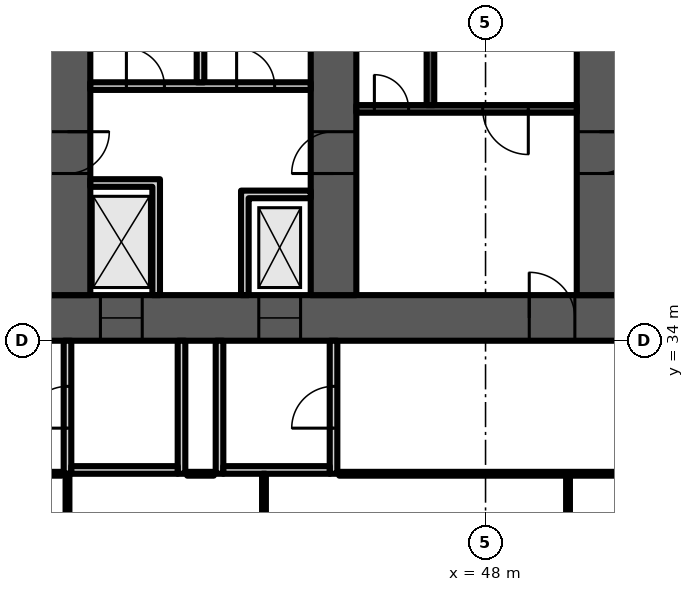
"""IFC4 building model, lengths in metres.
Left out: names, types, materials, properties, quantities, classifications, styles, units other than length and angle.
Written with IfcOpenShell. Run it as: python <this file> out.ifc"""

import sys

from ifc_helpers import new_model, si_unit, direction, frame, frame_2d, origin, place, context, subcontext, project, spatial, polyline, rectangle, outline, extrude, element, fill, save


model = new_model("IFC4")
c1 = context("Model", 3, precision=1e-05, world=origin(), true_north=direction((0.0, 1.0)))
c2 = subcontext(c1, "Body", "Model", "MODEL_VIEW")
j1 = project(units=[si_unit("LENGTHUNIT", "METRE"), si_unit("PLANEANGLEUNIT", "RADIAN")], contexts=[c1])
p1 = place(None, origin())
s1 = spatial("IfcSite", under=j1, at=p1, CompositionType="ELEMENT")
p2 = place(p1, origin())
s2 = spatial("IfcBuilding", under=s1, at=p2, CompositionType="ELEMENT")
p3 = place(p2, frame((0.0, 0.0, 48.7)))
s3 = spatial("IfcBuildingStorey", under=s2, at=p3, CompositionType="ELEMENT", Elevation=48.7)
p4 = place(p3, frame((9.0, 34.6, 0.0), z_axis=(0.0, 0.0, 1.0), x_axis=(1.0, 0.0, 0.0)))
e1 = element("IfcWall", 1, at=p4, inside=s3, PredefinedType="SHEAR", context=c2, shape_type="SweptSolid", body=[
    extrude(rectangle(XDim=56.0, YDim=1.2, at=frame_2d((28.0, 0.0))), origin(), (0.0, 0.0, 1.0), 3.6),
])
p5 = place(p4, frame((3.3, 0.0, 0.0)))
e2 = element("IfcOpeningElement", 2, at=p5, cuts=e1, PredefinedType="OPENING", context=c2, shape_type="SweptSolid", body=[
    extrude(rectangle(XDim=1.0, YDim=2.1, at=frame_2d((0.5, 1.05))), frame((0.0, 0.61, 0.0), z_axis=(0.0, -1.0, 0.0), x_axis=(1.0, 0.0, 0.0)), (0.0, 0.0, 1.0), 1.22),
])
p6 = place(p4, frame((7.867, 0.0, 0.0)))
e3 = element("IfcOpeningElement", 3, at=p6, cuts=e1, PredefinedType="OPENING", context=c2, shape_type="SweptSolid", body=[
    extrude(rectangle(XDim=1.1, YDim=2.1, at=frame_2d((0.55, 1.05))), frame((0.0, 0.61, 0.0), z_axis=(0.0, -1.0, 0.0), x_axis=(1.0, 0.0, 0.0)), (0.0, 0.0, 1.0), 1.22),
])
p7 = place(p4, frame((12.033, 0.0, 0.0)))
e4 = element("IfcOpeningElement", 4, at=p7, cuts=e1, PredefinedType="OPENING", context=c2, shape_type="SweptSolid", body=[
    extrude(rectangle(XDim=1.1, YDim=2.1, at=frame_2d((0.55, 1.05))), frame((0.0, 0.61, 0.0), z_axis=(0.0, -1.0, 0.0), x_axis=(1.0, 0.0, 0.0)), (0.0, 0.0, 1.0), 1.22),
])
p8 = place(p4, frame((9.8, 0.0, 0.0)))
e5 = element("IfcOpeningElement", 5, at=p8, cuts=e1, PredefinedType="OPENING", context=c2, shape_type="SweptSolid", body=[
    extrude(rectangle(XDim=1.4, YDim=2.1, at=frame_2d((0.7, 1.05))), frame((0.0, 0.61, 0.0), z_axis=(0.0, -1.0, 0.0), x_axis=(1.0, 0.0, 0.0)), (0.0, 0.0, 1.0), 1.22),
])
p9 = place(p4, frame((14.65, 0.0, 0.0)))
e6 = element("IfcOpeningElement", 6, at=p9, cuts=e1, PredefinedType="OPENING", context=c2, shape_type="SweptSolid", body=[
    extrude(rectangle(XDim=1.2, YDim=2.1, at=frame_2d((0.6, 1.05))), frame((0.0, 0.61, 0.0), z_axis=(0.0, -1.0, 0.0), x_axis=(1.0, 0.0, 0.0)), (0.0, 0.0, 1.0), 1.22),
])
p10 = place(p4, frame((21.867, 0.0, 0.0)))
e7 = element("IfcOpeningElement", 7, at=p10, cuts=e1, PredefinedType="OPENING", context=c2, shape_type="SweptSolid", body=[
    extrude(rectangle(XDim=1.1, YDim=2.1, at=frame_2d((0.55, 1.05))), frame((0.0, 0.61, 0.0), z_axis=(0.0, -1.0, 0.0), x_axis=(1.0, 0.0, 0.0)), (0.0, 0.0, 1.0), 1.22),
])
p11 = place(p4, frame((26.033, 0.0, 0.0)))
e8 = element("IfcOpeningElement", 8, at=p11, cuts=e1, PredefinedType="OPENING", context=c2, shape_type="SweptSolid", body=[
    extrude(rectangle(XDim=1.1, YDim=2.1, at=frame_2d((0.55, 1.05))), frame((0.0, 0.61, 0.0), z_axis=(0.0, -1.0, 0.0), x_axis=(1.0, 0.0, 0.0)), (0.0, 0.0, 1.0), 1.22),
])
p12 = place(p4, frame((23.8, 0.0, 0.0)))
e9 = element("IfcOpeningElement", 9, at=p12, cuts=e1, PredefinedType="OPENING", context=c2, shape_type="SweptSolid", body=[
    extrude(rectangle(XDim=1.4, YDim=2.1, at=frame_2d((0.7, 1.05))), frame((0.0, 0.61, 0.0), z_axis=(0.0, -1.0, 0.0), x_axis=(1.0, 0.0, 0.0)), (0.0, 0.0, 1.0), 1.22),
])
p13 = place(p4, frame((28.867, 0.0, 0.0)))
e10 = element("IfcOpeningElement", 10, at=p13, cuts=e1, PredefinedType="OPENING", context=c2, shape_type="SweptSolid", body=[
    extrude(rectangle(XDim=1.1, YDim=2.1, at=frame_2d((0.55, 1.05))), frame((0.0, 0.61, 0.0), z_axis=(0.0, -1.0, 0.0), x_axis=(1.0, 0.0, 0.0)), (0.0, 0.0, 1.0), 1.22),
])
p14 = place(p4, frame((33.033, 0.0, 0.0)))
e11 = element("IfcOpeningElement", 11, at=p14, cuts=e1, PredefinedType="OPENING", context=c2, shape_type="SweptSolid", body=[
    extrude(rectangle(XDim=1.1, YDim=2.1, at=frame_2d((0.55, 1.05))), frame((0.0, 0.61, 0.0), z_axis=(0.0, -1.0, 0.0), x_axis=(1.0, 0.0, 0.0)), (0.0, 0.0, 1.0), 1.22),
])
p15 = place(p4, frame((40.15, 0.0, 0.0)))
e12 = element("IfcOpeningElement", 12, at=p15, cuts=e1, PredefinedType="OPENING", context=c2, shape_type="SweptSolid", body=[
    extrude(rectangle(XDim=1.2, YDim=2.1, at=frame_2d((0.6, 1.05))), frame((0.0, 0.61, 0.0), z_axis=(0.0, -1.0, 0.0), x_axis=(1.0, 0.0, 0.0)), (0.0, 0.0, 1.0), 1.22),
])
p16 = place(p4, frame((44.8, 0.0, 0.0)))
e13 = element("IfcOpeningElement", 13, at=p16, cuts=e1, PredefinedType="OPENING", context=c2, shape_type="SweptSolid", body=[
    extrude(rectangle(XDim=1.4, YDim=2.1, at=frame_2d((0.7, 1.05))), frame((0.0, 0.61, 0.0), z_axis=(0.0, -1.0, 0.0), x_axis=(1.0, 0.0, 0.0)), (0.0, 0.0, 1.0), 1.22),
])
p17 = place(p4, frame((49.867, 0.0, 0.0)))
e14 = element("IfcOpeningElement", 14, at=p17, cuts=e1, PredefinedType="OPENING", context=c2, shape_type="SweptSolid", body=[
    extrude(rectangle(XDim=1.1, YDim=2.1, at=frame_2d((0.55, 1.05))), frame((0.0, 0.61, 0.0), z_axis=(0.0, -1.0, 0.0), x_axis=(1.0, 0.0, 0.0)), (0.0, 0.0, 1.0), 1.22),
])
p18 = place(p4, frame((53.5, 0.0, 0.0)))
e15 = element("IfcOpeningElement", 15, at=p18, cuts=e1, PredefinedType="OPENING", context=c2, shape_type="SweptSolid", body=[
    extrude(rectangle(XDim=1.1, YDim=2.1, at=frame_2d((0.55, 1.05))), frame((0.0, 0.61, 0.0), z_axis=(0.0, -1.0, 0.0), x_axis=(1.0, 0.0, 0.0)), (0.0, 0.0, 1.0), 1.22),
])
p19 = place(p4, frame((51.567, 0.0, 0.0)))
e16 = element("IfcOpeningElement", 16, at=p19, cuts=e1, PredefinedType="OPENING", context=c2, shape_type="SweptSolid", body=[
    extrude(rectangle(XDim=1.4, YDim=2.1, at=frame_2d((0.7, 1.05))), frame((0.0, 0.61, 0.0), z_axis=(0.0, -1.0, 0.0), x_axis=(1.0, 0.0, 0.0)), (0.0, 0.0, 1.0), 1.22),
])
p20 = place(p3, frame((37.0, 35.2, 0.0), z_axis=(0.0, 0.0, 1.0), x_axis=(0.0, 1.0, 0.0)))
e17 = element("IfcWall", 17, at=p20, inside=s3, PredefinedType="SHEAR", context=c2, shape_type="SweptSolid", body=[
    extrude(rectangle(XDim=14.78, YDim=1.2, at=frame_2d((7.39, 0.0))), origin(), (0.0, 0.0, 1.0), 3.6),
])
p21 = place(p20, frame((3.2, 0.0, 0.0)))
e18 = element("IfcOpeningElement", 18, at=p21, cuts=e17, PredefinedType="OPENING", context=c2, shape_type="SweptSolid", body=[
    extrude(rectangle(XDim=1.1, YDim=2.1, at=frame_2d((0.55, 1.05))), frame((0.0, 0.61, 0.0), z_axis=(0.0, -1.0, 0.0), x_axis=(1.0, 0.0, 0.0)), (0.0, 0.0, 1.0), 1.22),
])
p22 = place(p20, frame((9.6, 0.0, 0.0)))
e19 = element("IfcOpeningElement", 19, at=p22, cuts=e17, PredefinedType="OPENING", context=c2, shape_type="SweptSolid", body=[
    extrude(rectangle(XDim=1.0, YDim=2.1, at=frame_2d((0.5, 1.05))), frame((0.0, 0.61, 0.0), z_axis=(0.0, -1.0, 0.0), x_axis=(1.0, 0.0, 0.0)), (0.0, 0.0, 1.0), 1.22),
])
p23 = place(p3, frame((44.0, 35.2, 0.0), z_axis=(0.0, 0.0, 1.0), x_axis=(0.0, 1.0, 0.0)))
e20 = element("IfcWall", 20, at=p23, inside=s3, PredefinedType="SHEAR", context=c2, shape_type="SweptSolid", body=[
    extrude(rectangle(XDim=14.168, YDim=1.2, at=frame_2d((7.084, 0.0))), origin(), (0.0, 0.0, 1.0), 3.6),
])
p24 = place(p23, frame((3.2, 0.0, 0.0)))
e21 = element("IfcOpeningElement", 21, at=p24, cuts=e20, PredefinedType="OPENING", context=c2, shape_type="SweptSolid", body=[
    extrude(rectangle(XDim=1.1, YDim=2.1, at=frame_2d((0.55, 1.05))), frame((0.0, 0.61, 0.0), z_axis=(0.0, -1.0, 0.0), x_axis=(1.0, 0.0, 0.0)), (0.0, 0.0, 1.0), 1.22),
])
p25 = place(p23, frame((9.6, 0.0, 0.0)))
e22 = element("IfcOpeningElement", 22, at=p25, cuts=e20, PredefinedType="OPENING", context=c2, shape_type="SweptSolid", body=[
    extrude(rectangle(XDim=1.0, YDim=2.1, at=frame_2d((0.5, 1.05))), frame((0.0, 0.61, 0.0), z_axis=(0.0, -1.0, 0.0), x_axis=(1.0, 0.0, 0.0)), (0.0, 0.0, 1.0), 1.22),
])
p26 = place(p3, frame((51.0, 35.2, 0.0), z_axis=(0.0, 0.0, 1.0), x_axis=(0.0, 1.0, 0.0)))
e23 = element("IfcWall", 23, at=p26, inside=s3, PredefinedType="SHEAR", context=c2, shape_type="SweptSolid", body=[
    extrude(rectangle(XDim=13.555, YDim=1.2, at=frame_2d((6.778, 0.0))), origin(), (0.0, 0.0, 1.0), 3.6),
])
p27 = place(p26, frame((3.2, 0.0, 0.0)))
e24 = element("IfcOpeningElement", 24, at=p27, cuts=e23, PredefinedType="OPENING", context=c2, shape_type="SweptSolid", body=[
    extrude(rectangle(XDim=1.1, YDim=2.1, at=frame_2d((0.55, 1.05))), frame((0.0, 0.61, 0.0), z_axis=(0.0, -1.0, 0.0), x_axis=(1.0, 0.0, 0.0)), (0.0, 0.0, 1.0), 1.22),
])
p28 = place(p3, frame((37.6, 40.7, 0.0), z_axis=(0.0, 0.0, 1.0), x_axis=(1.0, 0.0, 0.0)))
e25 = element("IfcWall", 25, at=p28, inside=s3, PredefinedType="PARTITIONING", context=c2, shape_type="SweptSolid", body=[
    extrude(rectangle(XDim=5.8, YDim=0.2, at=frame_2d((2.9, 0.0))), origin(), (0.0, 0.0, 1.0), 3.2),
])
p29 = place(p28, frame((0.95, 0.0, 0.0)))
e26 = element("IfcOpeningElement", 26, at=p29, cuts=e25, PredefinedType="OPENING", context=c2, shape_type="SweptSolid", body=[
    extrude(rectangle(XDim=1.0, YDim=2.1, at=frame_2d((0.5, 1.05))), frame((0.0, 0.11, 0.0), z_axis=(0.0, -1.0, 0.0), x_axis=(1.0, 0.0, 0.0)), (0.0, 0.0, 1.0), 0.22),
])
p30 = place(p28, frame((3.85, 0.0, 0.0)))
e27 = element("IfcOpeningElement", 27, at=p30, cuts=e25, PredefinedType="OPENING", context=c2, shape_type="SweptSolid", body=[
    extrude(rectangle(XDim=1.0, YDim=2.1, at=frame_2d((0.5, 1.05))), frame((0.0, 0.11, 0.0), z_axis=(0.0, -1.0, 0.0), x_axis=(1.0, 0.0, 0.0)), (0.0, 0.0, 1.0), 0.22),
])
p31 = place(p3, frame((0.0, 0.0, -0.0)))
e28 = element("IfcWall", 28, at=p31, inside=s3, PredefinedType="PARTITIONING", context=c2, shape_type="SweptSolid", body=[
    extrude(outline(polyline([(41.567, 37.95), (41.767, 37.95), (43.4, 37.95), (43.4, 37.75), (41.767, 37.75), (41.767, 35.2), (41.567, 35.2), (41.567, 37.95)])), origin(), (0.0, 0.0, 1.0), 3.2),
])
p32 = place(p3, frame((0.0, 0.0, -0.0)))
e29 = element("IfcWall", 29, at=p32, inside=s3, PredefinedType="PARTITIONING", context=c2, shape_type="SweptSolid", body=[
    extrude(outline(polyline([(39.233, 38.05), (37.6, 38.05), (37.6, 38.25), (39.233, 38.25), (39.433, 38.25), (39.433, 35.2), (39.233, 35.2), (39.233, 38.05)])), origin(), (0.0, 0.0, 1.0), 3.2),
])
p33 = place(p3, frame((40.5, 40.8, 0.0), z_axis=(0.0, 0.0, 1.0), x_axis=(0.0, 1.0, 0.0)))
e30 = element("IfcWall", 30, at=p33, inside=s3, PredefinedType="PARTITIONING", context=c2, shape_type="SweptSolid", body=[
    extrude(rectangle(XDim=8.653, YDim=0.2, at=frame_2d((4.326, 0.0))), origin(), (0.0, 0.0, 1.0), 3.2),
])
p34 = place(p3, frame((44.6, 40.1, 0.0), z_axis=(0.0, 0.0, 1.0), x_axis=(1.0, 0.0, 0.0)))
e31 = element("IfcWall", 31, at=p34, inside=s3, PredefinedType="SHEAR", context=c2, shape_type="SweptSolid", body=[
    extrude(rectangle(XDim=5.8, YDim=0.2, at=frame_2d((2.9, 0.0))), origin(), (0.0, 0.0, 1.0), 3.2),
])
p35 = place(p34, frame((3.325, 0.0, 0.0)))
e32 = element("IfcOpeningElement", 32, at=p35, cuts=e31, PredefinedType="OPENING", context=c2, shape_type="SweptSolid", body=[
    extrude(rectangle(XDim=1.2, YDim=2.1, at=frame_2d((0.6, 1.05))), frame((0.0, 0.11, 0.0), z_axis=(0.0, -1.0, 0.0), x_axis=(1.0, 0.0, 0.0)), (0.0, 0.0, 1.0), 0.22),
])
p36 = place(p34, frame((0.475, 0.0, 0.0)))
e33 = element("IfcOpeningElement", 33, at=p36, cuts=e31, PredefinedType="OPENING", context=c2, shape_type="SweptSolid", body=[
    extrude(rectangle(XDim=0.9, YDim=2.1, at=frame_2d((0.45, 1.05))), frame((0.0, 0.11, 0.0), z_axis=(0.0, -1.0, 0.0), x_axis=(1.0, 0.0, 0.0)), (0.0, 0.0, 1.0), 0.22),
])
p37 = place(p3, frame((46.55, 40.2, 0.0), z_axis=(0.0, 0.0, 1.0), x_axis=(0.0, 1.0, 0.0)))
e34 = element("IfcWall", 34, at=p37, inside=s3, PredefinedType="SHEAR", context=c2, shape_type="SweptSolid", body=[
    extrude(rectangle(XDim=7.2, YDim=0.2, at=frame_2d((3.6, 0.0))), origin(), (0.0, 0.0, 1.0), 3.2),
])
p38 = place(p3, frame((37.0, 30.5, 0.0), z_axis=(0.0, 0.0, 1.0), x_axis=(0.0, 1.0, 0.0)))
e35 = element("IfcWall", 35, at=p38, inside=s3, PredefinedType="PARTITIONING", context=c2, shape_type="SweptSolid", body=[
    extrude(rectangle(XDim=3.5, YDim=0.2, at=frame_2d((1.75, 0.0))), origin(), (0.0, 0.0, 1.0), 3.2),
])
p39 = place(p38, frame((1.2, 0.0, 0.0)))
e36 = element("IfcOpeningElement", 36, at=p39, cuts=e35, PredefinedType="OPENING", context=c2, shape_type="SweptSolid", body=[
    extrude(rectangle(XDim=1.1, YDim=2.1, at=frame_2d((0.55, 1.05))), frame((0.0, 0.11, 0.0), z_axis=(0.0, -1.0, 0.0), x_axis=(1.0, 0.0, 0.0)), (0.0, 0.0, 1.0), 0.22),
])
p40 = place(p3, frame((40.0, 30.5, 0.0), z_axis=(0.0, 0.0, 1.0), x_axis=(0.0, 1.0, 0.0)))
e37 = element("IfcWall", 37, at=p40, inside=s3, PredefinedType="PARTITIONING", context=c2, shape_type="SweptSolid", body=[
    extrude(rectangle(XDim=3.5, YDim=0.2, at=frame_2d((1.75, 0.0))), origin(), (0.0, 0.0, 1.0), 3.2),
])
p41 = place(p3, frame((37.1, 30.6, 0.0), z_axis=(0.0, 0.0, 1.0), x_axis=(1.0, 0.0, 0.0)))
e38 = element("IfcWall", 38, at=p41, inside=s3, PredefinedType="PARTITIONING", context=c2, shape_type="SweptSolid", body=[
    extrude(rectangle(XDim=2.8, YDim=0.2, at=frame_2d((1.4, 0.0))), origin(), (0.0, 0.0, 1.0), 3.2),
])
p42 = place(p3, frame((41.0, 30.5, 0.0), z_axis=(0.0, 0.0, 1.0), x_axis=(0.0, 1.0, 0.0)))
e39 = element("IfcWall", 39, at=p42, inside=s3, PredefinedType="PARTITIONING", context=c2, shape_type="SweptSolid", body=[
    extrude(rectangle(XDim=3.5, YDim=0.2, at=frame_2d((1.75, 0.0))), origin(), (0.0, 0.0, 1.0), 3.2),
])
p43 = place(p3, frame((44.0, 30.5, 0.0), z_axis=(0.0, 0.0, 1.0), x_axis=(0.0, 1.0, 0.0)))
e40 = element("IfcWall", 40, at=p43, inside=s3, PredefinedType="PARTITIONING", context=c2, shape_type="SweptSolid", body=[
    extrude(rectangle(XDim=3.5, YDim=0.2, at=frame_2d((1.75, 0.0))), origin(), (0.0, 0.0, 1.0), 3.2),
])
p44 = place(p43, frame((1.2, 0.0, 0.0)))
e41 = element("IfcOpeningElement", 41, at=p44, cuts=e40, PredefinedType="OPENING", context=c2, shape_type="SweptSolid", body=[
    extrude(rectangle(XDim=1.1, YDim=2.1, at=frame_2d((0.55, 1.05))), frame((0.0, 0.11, 0.0), z_axis=(0.0, -1.0, 0.0), x_axis=(1.0, 0.0, 0.0)), (0.0, 0.0, 1.0), 0.22),
])
p45 = place(p3, frame((41.1, 30.6, 0.0), z_axis=(0.0, 0.0, 1.0), x_axis=(1.0, 0.0, 0.0)))
e42 = element("IfcWall", 42, at=p45, inside=s3, PredefinedType="PARTITIONING", context=c2, shape_type="SweptSolid", body=[
    extrude(rectangle(XDim=2.8, YDim=0.2, at=frame_2d((1.4, 0.0))), origin(), (0.0, 0.0, 1.0), 3.2),
])
p46 = place(p3, frame((10.8, 30.5, 0.0), z_axis=(0.0, 0.0, 1.0), x_axis=(1.0, 0.0, 0.0)))
e43 = element("IfcWall", 43, at=p46, inside=s3, PredefinedType="PARTITIONING", context=c2, shape_type="SweptSolid", body=[
    extrude(rectangle(XDim=26.05, YDim=0.1, at=frame_2d((13.025, 0.0))), origin(), (0.0, 0.0, 1.0), 3.2),
])
p47 = place(p46, frame((0.235, 0.0, 0.0)))
e44 = element("IfcOpeningElement", 44, at=p47, cuts=e43, PredefinedType="OPENING", context=c2, shape_type="SweptSolid", body=[
    extrude(rectangle(XDim=1.0, YDim=2.1, at=frame_2d((0.5, 1.05))), frame((0.0, 0.06, 0.0), z_axis=(0.0, -1.0, 0.0), x_axis=(1.0, 0.0, 0.0)), (0.0, 0.0, 1.0), 0.12),
])
p48 = place(p46, frame((10.955, 0.0, 0.0)))
e45 = element("IfcOpeningElement", 45, at=p48, cuts=e43, PredefinedType="OPENING", context=c2, shape_type="SweptSolid", body=[
    extrude(rectangle(XDim=1.0, YDim=2.1, at=frame_2d((0.5, 1.05))), frame((0.0, 0.06, 0.0), z_axis=(0.0, -1.0, 0.0), x_axis=(1.0, 0.0, 0.0)), (0.0, 0.0, 1.0), 0.12),
])
for number, where, z_axis, x_axis in (
    (46, (37.0, 14.24, 0.0), (0.0, 0.0, 1.0), (0.0, 1.0, 0.0)),
    (47, (42.17, 14.24, 0.0), (0.0, 0.0, 1.0), (0.0, 1.0, 0.0)),
    (48, (50.17, 14.24, 0.0), (0.0, 0.0, 1.0), (0.0, 1.0, 0.0)),
):
    element("IfcWall", number, at=place(p3, frame(where, z_axis=z_axis, x_axis=x_axis)), inside=s3, PredefinedType="PARTITIONING", context=c2, shape_type="SweptSolid", body=[
        extrude(rectangle(XDim=16.26, YDim=0.1, at=frame_2d((8.13, 0.0))), origin(), (0.0, 0.0, 1.0), 3.2),
    ])
p49 = place(p3, frame((40.15, 30.5, 0.0), z_axis=(0.0, 0.0, 1.0), x_axis=(1.0, 0.0, 0.0)))
e49 = element("IfcWall", 49, at=p49, inside=s3, PredefinedType="PARTITIONING", context=c2, shape_type="SweptSolid", body=[
    extrude(rectangle(XDim=0.7, YDim=0.1, at=frame_2d((0.35, 0.0))), origin(), (0.0, 0.0, 1.0), 3.2),
])
p50 = place(p3, frame((44.15, 30.5, 0.0), z_axis=(0.0, 0.0, 1.0), x_axis=(1.0, 0.0, 0.0)))
e50 = element("IfcWall", 50, at=p50, inside=s3, PredefinedType="PARTITIONING", context=c2, shape_type="SweptSolid", body=[
    extrude(rectangle(XDim=19.42, YDim=0.1, at=frame_2d((9.71, 0.0))), origin(), (0.0, 0.0, 1.0), 3.2),
])
p51 = place(p50, frame((15.54, 0.0, 0.0)))
e51 = element("IfcOpeningElement", 51, at=p51, cuts=e50, PredefinedType="OPENING", context=c2, shape_type="SweptSolid", body=[
    extrude(rectangle(XDim=1.0, YDim=2.1, at=frame_2d((0.5, 1.05))), frame((0.0, 0.06, 0.0), z_axis=(0.0, -1.0, 0.0), x_axis=(1.0, 0.0, 0.0)), (0.0, 0.0, 1.0), 0.12),
])
p52 = place(p13, origin())
e52 = element("IfcDoor", 52, at=p52, inside=s3, OperationType="DOUBLE_DOOR_SLIDING", PredefinedType="DOOR", context=c2, shape_type="SweptSolid", body=[
    extrude(rectangle(XDim=1.1, YDim=2.1, at=frame_2d((0.55, 1.05))), frame((0.0, 0.025, 0.0), z_axis=(0.0, -1.0, 0.0), x_axis=(1.0, 0.0, 0.0)), (0.0, 0.0, 1.0), 0.05),
])
fill(e10, e52)
p53 = place(p14, origin())
e53 = element("IfcDoor", 53, at=p53, inside=s3, OperationType="DOUBLE_DOOR_SLIDING", PredefinedType="DOOR", context=c2, shape_type="SweptSolid", body=[
    extrude(rectangle(XDim=1.1, YDim=2.1, at=frame_2d((0.55, 1.05))), frame((0.0, 0.025, 0.0), z_axis=(0.0, -1.0, 0.0), x_axis=(1.0, 0.0, 0.0)), (0.0, 0.0, 1.0), 0.05),
])
fill(e11, e53)
p54 = place(p29, origin())
e54 = element("IfcDoor", 54, at=p54, inside=s3, OperationType="SINGLE_SWING_LEFT", PredefinedType="DOOR", context=c2, shape_type="SweptSolid", body=[
    extrude(rectangle(XDim=1.0, YDim=2.1, at=frame_2d((0.5, 1.05))), frame((0.0, 0.025, 0.0), z_axis=(0.0, -1.0, 0.0), x_axis=(1.0, 0.0, 0.0)), (0.0, 0.0, 1.0), 0.05),
])
fill(e26, e54)
p55 = place(p30, origin())
e55 = element("IfcDoor", 55, at=p55, inside=s3, OperationType="SINGLE_SWING_LEFT", PredefinedType="DOOR", context=c2, shape_type="SweptSolid", body=[
    extrude(rectangle(XDim=1.0, YDim=2.1, at=frame_2d((0.5, 1.05))), frame((0.0, 0.025, 0.0), z_axis=(0.0, -1.0, 0.0), x_axis=(1.0, 0.0, 0.0)), (0.0, 0.0, 1.0), 0.05),
])
fill(e27, e55)
p56 = place(p35, origin())
e56 = element("IfcDoor", 56, at=p56, inside=s3, OperationType="SINGLE_SWING_RIGHT", PredefinedType="DOOR", context=c2, shape_type="SweptSolid", body=[
    extrude(rectangle(XDim=1.2, YDim=2.1, at=frame_2d((0.6, 1.05))), frame((0.0, 0.025, 0.0), z_axis=(0.0, -1.0, 0.0), x_axis=(1.0, 0.0, 0.0)), (0.0, 0.0, 1.0), 0.05),
])
fill(e32, e56)
p57 = place(p36, origin())
e57 = element("IfcDoor", 57, at=p57, inside=s3, OperationType="SINGLE_SWING_LEFT", PredefinedType="DOOR", context=c2, shape_type="SweptSolid", body=[
    extrude(rectangle(XDim=0.9, YDim=2.1, at=frame_2d((0.45, 1.05))), frame((0.0, 0.025, 0.0), z_axis=(0.0, -1.0, 0.0), x_axis=(1.0, 0.0, 0.0)), (0.0, 0.0, 1.0), 0.05),
])
fill(e33, e57)
p58 = place(p15, origin())
e58 = element("IfcDoor", 58, at=p58, inside=s3, OperationType="SINGLE_SWING_LEFT", PredefinedType="DOOR", context=c2, shape_type="SweptSolid", body=[
    extrude(rectangle(XDim=1.2, YDim=2.1, at=frame_2d((0.6, 1.05))), frame((0.0, 0.025, 0.0), z_axis=(0.0, -1.0, 0.0), x_axis=(1.0, 0.0, 0.0)), (0.0, 0.0, 1.0), 0.05),
])
fill(e12, e58)
p59 = place(p21, origin())
e59 = element("IfcDoor", 59, at=p59, inside=s3, OperationType="SINGLE_SWING_RIGHT", PredefinedType="DOOR", context=c2, shape_type="SweptSolid", body=[
    extrude(rectangle(XDim=1.1, YDim=2.1, at=frame_2d((0.55, 1.05))), frame((0.0, 0.025, 0.0), z_axis=(0.0, -1.0, 0.0), x_axis=(1.0, 0.0, 0.0)), (0.0, 0.0, 1.0), 0.05),
])
fill(e18, e59)
p60 = place(p24, origin())
e60 = element("IfcDoor", 60, at=p60, inside=s3, OperationType="SINGLE_SWING_LEFT", PredefinedType="DOOR", context=c2, shape_type="SweptSolid", body=[
    extrude(rectangle(XDim=1.1, YDim=2.1, at=frame_2d((0.55, 1.05))), frame((0.0, 0.025, 0.0), z_axis=(0.0, -1.0, 0.0), x_axis=(1.0, 0.0, 0.0)), (0.0, 0.0, 1.0), 0.05),
])
fill(e21, e60)
p61 = place(p27, origin())
e61 = element("IfcDoor", 61, at=p61, inside=s3, OperationType="SINGLE_SWING_RIGHT", PredefinedType="DOOR", context=c2, shape_type="SweptSolid", body=[
    extrude(rectangle(XDim=1.1, YDim=2.1, at=frame_2d((0.55, 1.05))), frame((0.0, 0.025, 0.0), z_axis=(0.0, -1.0, 0.0), x_axis=(1.0, 0.0, 0.0)), (0.0, 0.0, 1.0), 0.05),
])
fill(e24, e61)
p62 = place(p39, origin())
e62 = element("IfcDoor", 62, at=p62, inside=s3, OperationType="SINGLE_SWING_LEFT", PredefinedType="DOOR", context=c2, shape_type="SweptSolid", body=[
    extrude(rectangle(XDim=1.1, YDim=2.1, at=frame_2d((0.55, 1.05))), frame((0.0, 0.025, 0.0), z_axis=(0.0, -1.0, 0.0), x_axis=(1.0, 0.0, 0.0)), (0.0, 0.0, 1.0), 0.05),
])
fill(e36, e62)
p63 = place(p44, origin())
e63 = element("IfcDoor", 63, at=p63, inside=s3, OperationType="SINGLE_SWING_LEFT", PredefinedType="DOOR", context=c2, shape_type="SweptSolid", body=[
    extrude(rectangle(XDim=1.1, YDim=2.1, at=frame_2d((0.55, 1.05))), frame((0.0, 0.025, 0.0), z_axis=(0.0, -1.0, 0.0), x_axis=(1.0, 0.0, 0.0)), (0.0, 0.0, 1.0), 0.05),
])
fill(e41, e63)
save(model, sys.argv[1])
